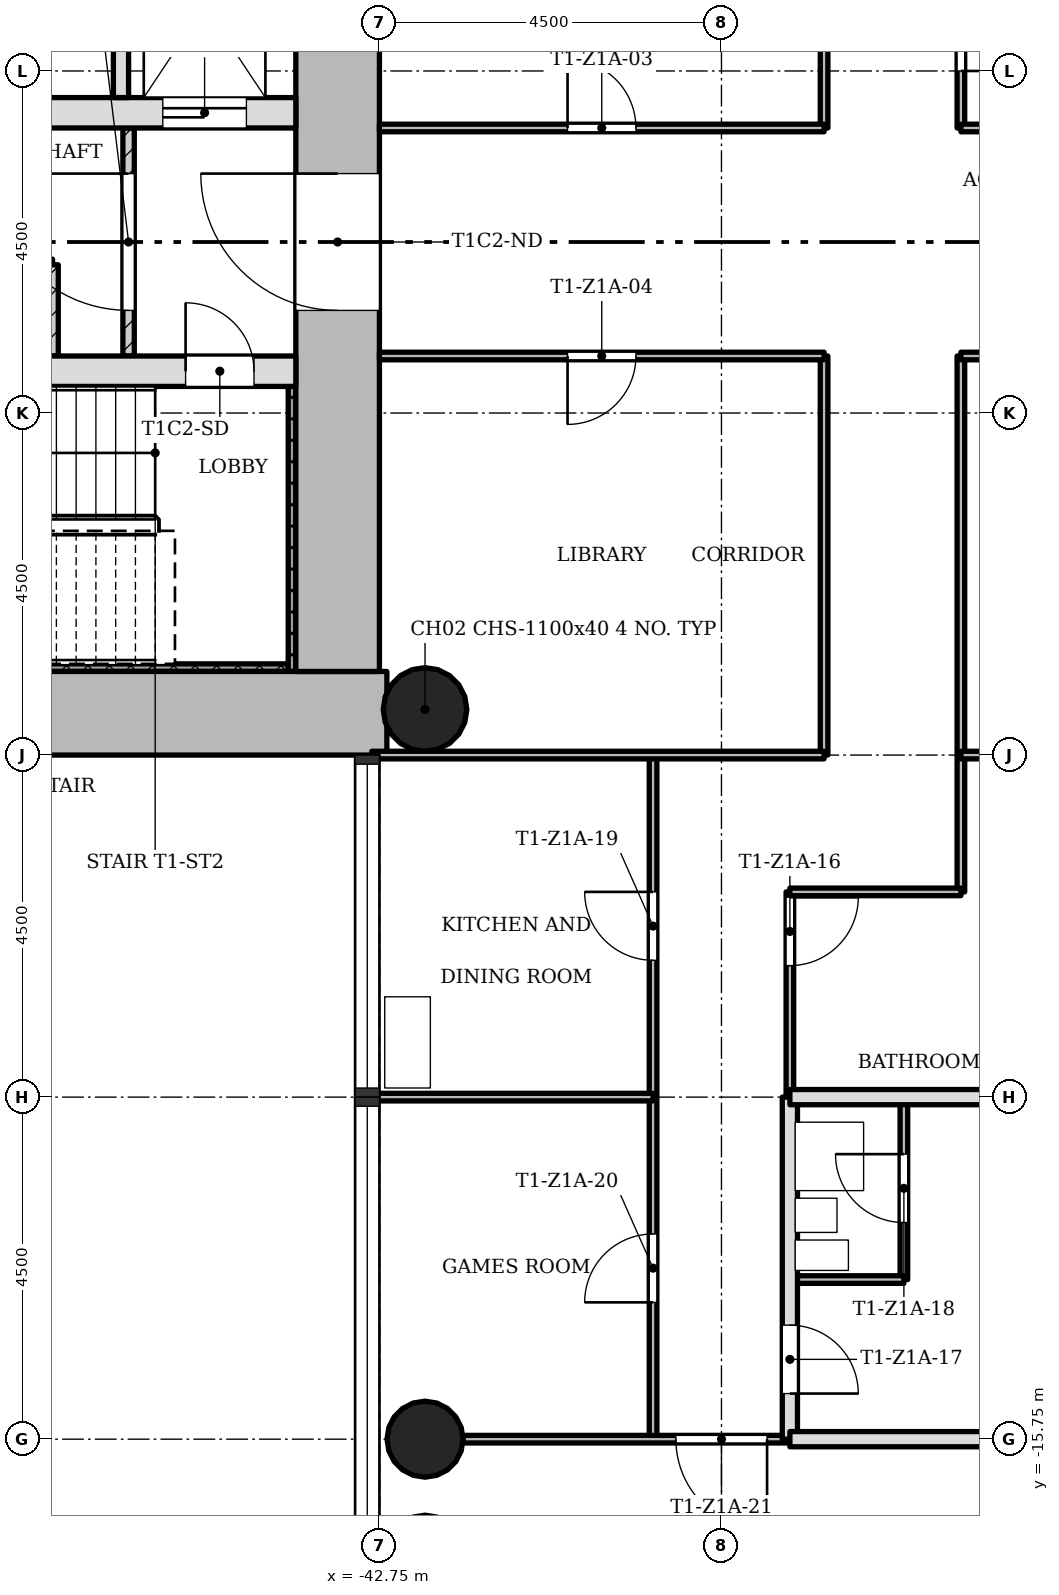
"""IFC4 building model, lengths in metres.
Left out: names, types, materials, properties, quantities, classifications, styles, units other than length and angle.
Written with IfcOpenShell. Run it as: python <this file> out.ifc"""

import sys

from ifc_helpers import new_model, si_unit, direction, frame, frame_2d, origin, origin_2d, place, context, subcontext, project, spatial, rectangle, hollow_circle, extrude, element, fill, save


model = new_model("IFC4")
c1 = context("Model", 3, precision=1e-05, world=origin(), true_north=direction((0.0, 1.0)))
c2 = subcontext(c1, "Body", "Model", "MODEL_VIEW")
j1 = project(units=[si_unit("LENGTHUNIT", "METRE"), si_unit("PLANEANGLEUNIT", "RADIAN")], contexts=[c1])
p1 = place(None, origin())
s1 = spatial("IfcSite", under=j1, at=p1, CompositionType="ELEMENT")
p2 = place(p1, origin())
s2 = spatial("IfcBuilding", under=s1, at=p2, CompositionType="ELEMENT")
p3 = place(p2, frame((0.0, 0.0, 27.9)))
s3 = spatial("IfcBuildingStorey", under=s2, at=p3, CompositionType="ELEMENT", Elevation=27.9)
p4 = place(p3, frame((-50.65, -6.2, 0.0), z_axis=(0.0, 0.0, 1.0), x_axis=(1.0, 0.0, 0.0)))
e1 = element("IfcWall", 1, at=p4, inside=s3, PredefinedType="SHEAR", context=c2, shape_type="SweptSolid", body=[
    extrude(rectangle(XDim=7.998, YDim=1.1, at=frame_2d((3.999, 0.0))), origin(), (0.0, 0.0, 1.0), 3.4),
])
p5 = place(p3, frame((-43.3, -5.65, 0.0), z_axis=(0.0, 0.0, 1.0), x_axis=(0.0, 1.0, 0.0)))
e2 = element("IfcWall", 2, at=p5, inside=s3, PredefinedType="SHEAR", context=c2, shape_type="SweptSolid", body=[
    extrude(rectangle(XDim=12.4, YDim=1.1, at=frame_2d((6.2, 0.0))), origin(), (0.0, 0.0, 1.0), 3.4),
])
p6 = place(p5, frame((4.75, 0.0, 0.0)))
e3 = element("IfcOpeningElement", 3, at=p6, cuts=e2, PredefinedType="OPENING", context=c2, shape_type="SweptSolid", body=[
    extrude(rectangle(XDim=1.8, YDim=2.1, at=frame_2d((0.9, 1.05))), frame((0.0, 0.56, 0.0), z_axis=(0.0, -1.0, 0.0), x_axis=(1.0, 0.0, 0.0)), (0.0, 0.0, 1.0), 1.12),
])
p7 = place(p3, frame((-50.65, -1.7, 0.0), z_axis=(0.0, 0.0, 1.0), x_axis=(1.0, 0.0, 0.0)))
e4 = element("IfcWall", 4, at=p7, inside=s3, PredefinedType="SHEAR", context=c2, shape_type="SweptSolid", body=[
    extrude(rectangle(XDim=6.8, YDim=0.4, at=frame_2d((3.4, 0.0))), origin(), (0.0, 0.0, 1.0), 3.4),
])
p8 = place(p7, frame((5.35, 0.0, 0.0)))
e5 = element("IfcOpeningElement", 5, at=p8, cuts=e4, PredefinedType="OPENING", context=c2, shape_type="SweptSolid", body=[
    extrude(rectangle(XDim=0.9, YDim=2.1, at=frame_2d((0.45, 1.05))), frame((0.0, 0.21, 0.0), z_axis=(0.0, -1.0, 0.0), x_axis=(1.0, 0.0, 0.0)), (0.0, 0.0, 1.0), 0.42),
])
p9 = place(p3, frame((-50.65, 1.7, 0.0), z_axis=(0.0, 0.0, 1.0), x_axis=(1.0, 0.0, 0.0)))
e6 = element("IfcWall", 6, at=p9, inside=s3, PredefinedType="SHEAR", context=c2, shape_type="SweptSolid", body=[
    extrude(rectangle(XDim=6.8, YDim=0.4, at=frame_2d((3.4, 0.0))), origin(), (0.0, 0.0, 1.0), 3.4),
])
p10 = place(p9, frame((5.05, 0.0, 0.0)))
e7 = element("IfcOpeningElement", 7, at=p10, cuts=e6, PredefinedType="OPENING", context=c2, shape_type="SweptSolid", body=[
    extrude(rectangle(XDim=1.1, YDim=2.1, at=frame_2d((0.55, 1.05))), frame((0.0, 0.21, 0.0), z_axis=(0.0, -1.0, 0.0), x_axis=(1.0, 0.0, 0.0)), (0.0, 0.0, 1.0), 0.42),
])
p11 = place(p3, frame((-42.15, -15.75, 0.0), z_axis=(0.0, 0.0, 1.0), x_axis=(1.0, 0.0, 0.0)))
e8 = element("IfcColumn", 8, at=p11, inside=s3, PredefinedType="COLUMN", context=c2, shape_type="SweptSolid", body=[
    extrude(hollow_circle(Radius=0.5, WallThickness=0.036, at=origin_2d()), origin(), (0.0, 0.0, 1.0), 3.4),
])
p12 = place(p3, frame((-42.15, -6.15, 0.0), z_axis=(0.0, 0.0, 1.0), x_axis=(1.0, 0.0, 0.0)))
e9 = element("IfcColumn", 9, at=p12, inside=s3, PredefinedType="COLUMN", context=c2, shape_type="SweptSolid", body=[
    extrude(hollow_circle(Radius=0.55, WallThickness=0.04, at=origin_2d()), origin(), (0.0, 0.0, 1.0), 3.4),
])
p13 = place(p3, frame((-46.05, 1.5, 0.0), z_axis=(0.0, 0.0, 1.0), x_axis=(0.0, -1.0, 0.0)))
e10 = element("IfcWall", 10, at=p13, inside=s3, PredefinedType="PARTITIONING", context=c2, shape_type="SweptSolid", body=[
    extrude(rectangle(XDim=3.0, YDim=0.15, at=frame_2d((1.5, 0.0))), origin(), (0.0, 0.0, 1.0), 3.0),
])
p14 = place(p13, frame((0.6, 0.0, 0.0)))
e11 = element("IfcOpeningElement", 11, at=p14, cuts=e10, PredefinedType="OPENING", context=c2, shape_type="SweptSolid", body=[
    extrude(rectangle(XDim=1.8, YDim=2.1, at=frame_2d((0.9, 1.05))), frame((0.0, 0.085, 0.0), z_axis=(0.0, -1.0, 0.0), x_axis=(1.0, 0.0, 0.0)), (0.0, 0.0, 1.0), 0.17),
])
p15 = place(p3, frame((-46.15, 5.65, 0.0), z_axis=(0.0, 0.0, 1.0), x_axis=(0.0, -1.0, 0.0)))
e12 = element("IfcWall", 12, at=p15, inside=s3, PredefinedType="SOLIDWALL", context=c2, shape_type="SweptSolid", body=[
    extrude(rectangle(XDim=3.75, YDim=0.2, at=frame_2d((1.875, 0.0))), origin(), (0.0, 0.0, 1.0), 3.0),
])
p16 = place(p3, frame((-47.05, -0.3, 0.0), z_axis=(0.0, 0.0, 1.0), x_axis=(0.0, -1.0, 0.0)))
e13 = element("IfcWall", 13, at=p16, inside=s3, PredefinedType="PARTITIONING", context=c2, shape_type="SweptSolid", body=[
    extrude(rectangle(XDim=1.2, YDim=0.15, at=frame_2d((0.6, 0.0))), origin(), (0.0, 0.0, 1.0), 3.0),
])
p17 = place(p3, frame((-39.15, -15.75, 0.0), z_axis=(0.0, 0.0, 1.0), x_axis=(0.0, 1.0, 0.0)))
e14 = element("IfcWall", 14, at=p17, inside=s3, PredefinedType="PARTITIONING", context=c2, shape_type="SweptSolid", body=[
    extrude(rectangle(XDim=9.0, YDim=0.1, at=frame_2d((4.5, 0.0))), origin(), (0.0, 0.0, 1.0), 3.0),
])
p18 = place(p17, frame((6.3, 0.0, 0.0)))
e15 = element("IfcOpeningElement", 15, at=p18, cuts=e14, PredefinedType="OPENING", context=c2, shape_type="SweptSolid", body=[
    extrude(rectangle(XDim=0.9, YDim=2.1, at=frame_2d((0.45, 1.05))), frame((0.0, 0.06, 0.0), z_axis=(0.0, -1.0, 0.0), x_axis=(1.0, 0.0, 0.0)), (0.0, 0.0, 1.0), 0.12),
])
p19 = place(p17, frame((1.8, 0.0, 0.0)))
e16 = element("IfcOpeningElement", 16, at=p19, cuts=e14, PredefinedType="OPENING", context=c2, shape_type="SweptSolid", body=[
    extrude(rectangle(XDim=0.9, YDim=2.1, at=frame_2d((0.45, 1.05))), frame((0.0, 0.06, 0.0), z_axis=(0.0, -1.0, 0.0), x_axis=(1.0, 0.0, 0.0)), (0.0, 0.0, 1.0), 0.12),
])
p20 = place(p3, frame((-37.35, -11.25, 0.0), z_axis=(0.0, 0.0, 1.0), x_axis=(0.0, 1.0, 0.0)))
e17 = element("IfcWall", 17, at=p20, inside=s3, PredefinedType="PARTITIONING", context=c2, shape_type="SweptSolid", body=[
    extrude(rectangle(XDim=2.7, YDim=0.1, at=frame_2d((1.35, 0.0))), origin(), (0.0, 0.0, 1.0), 3.0),
])
p21 = place(p20, frame((1.73, 0.0, 0.0)))
e18 = element("IfcOpeningElement", 18, at=p21, cuts=e17, PredefinedType="OPENING", context=c2, shape_type="SweptSolid", body=[
    extrude(rectangle(XDim=0.9, YDim=2.1, at=frame_2d((0.45, 1.05))), frame((0.0, 0.06, 0.0), z_axis=(0.0, -1.0, 0.0), x_axis=(1.0, 0.0, 0.0)), (0.0, 0.0, 1.0), 0.12),
])
p22 = place(p3, frame((-37.35, -15.75, 0.0), z_axis=(0.0, 0.0, 1.0), x_axis=(0.0, 1.0, 0.0)))
e19 = element("IfcWall", 19, at=p22, inside=s3, PredefinedType="SOLIDWALL", context=c2, shape_type="SweptSolid", body=[
    extrude(rectangle(XDim=4.5, YDim=0.2, at=frame_2d((2.25, 0.0))), origin(), (0.0, 0.0, 1.0), 3.0),
])
p23 = place(p22, frame((0.6, 0.0, 0.0)))
e20 = element("IfcOpeningElement", 20, at=p23, cuts=e19, PredefinedType="OPENING", context=c2, shape_type="SweptSolid", body=[
    extrude(rectangle(XDim=0.9, YDim=2.1, at=frame_2d((0.45, 1.05))), frame((0.0, 0.11, 0.0), z_axis=(0.0, -1.0, 0.0), x_axis=(1.0, 0.0, 0.0)), (0.0, 0.0, 1.0), 0.22),
])
for number, where, z_axis, x_axis in (
    (21, (-36.9, -6.75, 0.0), (0.0, 0.0, 1.0), (0.0, 1.0, 0.0)),
    (22, (-36.9, 1.5, 0.0), (0.0, 0.0, 1.0), (0.0, 1.0, 0.0)),
):
    element("IfcWall", number, at=place(p3, frame(where, z_axis=z_axis, x_axis=x_axis)), inside=s3, PredefinedType="PARTITIONING", context=c2, shape_type="SweptSolid", body=[
        extrude(rectangle(XDim=5.25, YDim=0.1, at=frame_2d((2.625, 0.0))), origin(), (0.0, 0.0, 1.0), 3.0),
    ])
p24 = place(p3, frame((-35.85, -13.65, 0.0), z_axis=(0.0, 0.0, 1.0), x_axis=(0.0, 1.0, 0.0)))
e23 = element("IfcWall", 23, at=p24, inside=s3, PredefinedType="PARTITIONING", context=c2, shape_type="SweptSolid", body=[
    extrude(rectangle(XDim=2.4, YDim=0.1, at=frame_2d((1.2, 0.0))), origin(), (0.0, 0.0, 1.0), 3.0),
])
p25 = place(p24, frame((0.75, 0.0, 0.0)))
e24 = element("IfcOpeningElement", 24, at=p25, cuts=e23, PredefinedType="OPENING", context=c2, shape_type="SweptSolid", body=[
    extrude(rectangle(XDim=0.9, YDim=2.1, at=frame_2d((0.45, 1.05))), frame((0.0, 0.06, 0.0), z_axis=(0.0, -1.0, 0.0), x_axis=(1.0, 0.0, 0.0)), (0.0, 0.0, 1.0), 0.12),
])
p26 = place(p3, frame((-35.1, -8.55, 0.0), z_axis=(0.0, 0.0, 1.0), x_axis=(0.0, 1.0, 0.0)))
e25 = element("IfcWall", 25, at=p26, inside=s3, PredefinedType="PARTITIONING", context=c2, shape_type="SweptSolid", body=[
    extrude(rectangle(XDim=7.05, YDim=0.1, at=frame_2d((3.525, 0.0))), origin(), (0.0, 0.0, 1.0), 3.0),
])
p27 = place(p3, frame((-35.1, 1.5, 0.0), z_axis=(0.0, 0.0, 1.0), x_axis=(0.0, 1.0, 0.0)))
e26 = element("IfcWall", 26, at=p27, inside=s3, PredefinedType="PARTITIONING", context=c2, shape_type="SweptSolid", body=[
    extrude(rectangle(XDim=5.25, YDim=0.1, at=frame_2d((2.625, 0.0))), origin(), (0.0, 0.0, 1.0), 3.0),
])
p28 = place(p27, frame((0.75, 0.0, 0.0)))
e27 = element("IfcOpeningElement", 27, at=p28, cuts=e26, PredefinedType="OPENING", context=c2, shape_type="SweptSolid", body=[
    extrude(rectangle(XDim=0.9, YDim=2.1, at=frame_2d((0.45, 1.05))), frame((0.0, 0.06, 0.0), z_axis=(0.0, -1.0, 0.0), x_axis=(1.0, 0.0, 0.0)), (0.0, 0.0, 1.0), 0.12),
])
p29 = place(p3, frame((-41.65, -15.75, 0.0), z_axis=(0.0, 0.0, 1.0), x_axis=(1.0, 0.0, 0.0)))
e28 = element("IfcWall", 28, at=p29, inside=s3, PredefinedType="PARTITIONING", context=c2, shape_type="SweptSolid", body=[
    extrude(rectangle(XDim=4.3, YDim=0.1, at=frame_2d((2.15, 0.0))), origin(), (0.0, 0.0, 1.0), 3.0),
])
p30 = place(p29, frame((2.8, 0.0, 0.0)))
e29 = element("IfcOpeningElement", 29, at=p30, cuts=e28, PredefinedType="OPENING", context=c2, shape_type="SweptSolid", body=[
    extrude(rectangle(XDim=1.2, YDim=2.1, at=frame_2d((0.6, 1.05))), frame((0.0, 0.06, 0.0), z_axis=(0.0, -1.0, 0.0), x_axis=(1.0, 0.0, 0.0)), (0.0, 0.0, 1.0), 0.12),
])
p31 = place(p3, frame((-37.35, -15.75, 0.0), z_axis=(0.0, 0.0, 1.0), x_axis=(1.0, 0.0, 0.0)))
e30 = element("IfcWall", 30, at=p31, inside=s3, PredefinedType="SOLIDWALL", context=c2, shape_type="SweptSolid", body=[
    extrude(rectangle(XDim=7.0, YDim=0.2, at=frame_2d((3.5, 0.0))), origin(), (0.0, 0.0, 1.0), 3.0),
])
p32 = place(p3, frame((-37.35, -13.65, 0.0), z_axis=(0.0, 0.0, 1.0), x_axis=(1.0, 0.0, 0.0)))
e31 = element("IfcWall", 31, at=p32, inside=s3, PredefinedType="PARTITIONING", context=c2, shape_type="SweptSolid", body=[
    extrude(rectangle(XDim=1.5, YDim=0.1, at=frame_2d((0.75, 0.0))), origin(), (0.0, 0.0, 1.0), 3.0),
])
p33 = place(p3, frame((-42.85, -11.25, 0.0), z_axis=(0.0, 0.0, 1.0), x_axis=(1.0, 0.0, 0.0)))
e32 = element("IfcWall", 32, at=p33, inside=s3, PredefinedType="PARTITIONING", context=c2, shape_type="SweptSolid", body=[
    extrude(rectangle(XDim=3.7, YDim=0.1, at=frame_2d((1.85, 0.0))), origin(), (0.0, 0.0, 1.0), 3.0),
])
p34 = place(p3, frame((-37.35, -11.25, 0.0), z_axis=(0.0, 0.0, 1.0), x_axis=(1.0, 0.0, 0.0)))
e33 = element("IfcWall", 33, at=p34, inside=s3, PredefinedType="SOLIDWALL", context=c2, shape_type="SweptSolid", body=[
    extrude(rectangle(XDim=8.2, YDim=0.2, at=frame_2d((4.1, 0.0))), origin(), (0.0, 0.0, 1.0), 3.0),
])
p35 = place(p3, frame((-37.35, -8.55, 0.0), z_axis=(0.0, 0.0, 1.0), x_axis=(1.0, 0.0, 0.0)))
e34 = element("IfcWall", 34, at=p35, inside=s3, PredefinedType="PARTITIONING", context=c2, shape_type="SweptSolid", body=[
    extrude(rectangle(XDim=2.25, YDim=0.1, at=frame_2d((1.125, 0.0))), origin(), (0.0, 0.0, 1.0), 3.0),
])
for number, where, z_axis, x_axis in (
    (35, (-42.85, -6.75, 0.0), (0.0, 0.0, 1.0), (1.0, 0.0, 0.0)),
    (36, (-35.1, -6.75, 0.0), (0.0, 0.0, 1.0), (1.0, 0.0, 0.0)),
):
    element("IfcWall", number, at=place(p3, frame(where, z_axis=z_axis, x_axis=x_axis)), inside=s3, PredefinedType="PARTITIONING", context=c2, shape_type="SweptSolid", body=[
        extrude(rectangle(XDim=5.95, YDim=0.1, at=frame_2d((2.975, 0.0))), origin(), (0.0, 0.0, 1.0), 3.0),
    ])
p36 = place(p3, frame((-42.75, -1.5, 0.0), z_axis=(0.0, 0.0, 1.0), x_axis=(1.0, 0.0, 0.0)))
e37 = element("IfcWall", 37, at=p36, inside=s3, PredefinedType="PARTITIONING", context=c2, shape_type="SweptSolid", body=[
    extrude(rectangle(XDim=5.85, YDim=0.1, at=frame_2d((2.925, 0.0))), origin(), (0.0, 0.0, 1.0), 3.0),
])
p37 = place(p36, frame((2.475, 0.0, 0.0)))
e38 = element("IfcOpeningElement", 38, at=p37, cuts=e37, PredefinedType="OPENING", context=c2, shape_type="SweptSolid", body=[
    extrude(rectangle(XDim=0.9, YDim=2.1, at=frame_2d((0.45, 1.05))), frame((0.0, 0.06, 0.0), z_axis=(0.0, -1.0, 0.0), x_axis=(1.0, 0.0, 0.0)), (0.0, 0.0, 1.0), 0.12),
])
p38 = place(p3, frame((-35.1, -1.5, 0.0), z_axis=(0.0, 0.0, 1.0), x_axis=(1.0, 0.0, 0.0)))
e39 = element("IfcWall", 39, at=p38, inside=s3, PredefinedType="PARTITIONING", context=c2, shape_type="SweptSolid", body=[
    extrude(rectangle(XDim=5.85, YDim=0.1, at=frame_2d((2.925, 0.0))), origin(), (0.0, 0.0, 1.0), 3.0),
])
p39 = place(p38, frame((2.475, 0.0, 0.0)))
e40 = element("IfcOpeningElement", 40, at=p39, cuts=e39, PredefinedType="OPENING", context=c2, shape_type="SweptSolid", body=[
    extrude(rectangle(XDim=0.9, YDim=2.1, at=frame_2d((0.45, 1.05))), frame((0.0, 0.06, 0.0), z_axis=(0.0, -1.0, 0.0), x_axis=(1.0, 0.0, 0.0)), (0.0, 0.0, 1.0), 0.12),
])
p40 = place(p3, frame((-42.75, 1.5, 0.0), z_axis=(0.0, 0.0, 1.0), x_axis=(1.0, 0.0, 0.0)))
e41 = element("IfcWall", 41, at=p40, inside=s3, PredefinedType="PARTITIONING", context=c2, shape_type="SweptSolid", body=[
    extrude(rectangle(XDim=5.85, YDim=0.1, at=frame_2d((2.925, 0.0))), origin(), (0.0, 0.0, 1.0), 3.0),
])
p41 = place(p40, frame((2.475, 0.0, 0.0)))
e42 = element("IfcOpeningElement", 42, at=p41, cuts=e41, PredefinedType="OPENING", context=c2, shape_type="SweptSolid", body=[
    extrude(rectangle(XDim=0.9, YDim=2.1, at=frame_2d((0.45, 1.05))), frame((0.0, 0.06, 0.0), z_axis=(0.0, -1.0, 0.0), x_axis=(1.0, 0.0, 0.0)), (0.0, 0.0, 1.0), 0.12),
])
p42 = place(p3, frame((-35.1, 1.5, 0.0), z_axis=(0.0, 0.0, 1.0), x_axis=(1.0, 0.0, 0.0)))
e43 = element("IfcWall", 43, at=p42, inside=s3, PredefinedType="PARTITIONING", context=c2, shape_type="SweptSolid", body=[
    extrude(rectangle(XDim=5.85, YDim=0.1, at=frame_2d((2.925, 0.0))), origin(), (0.0, 0.0, 1.0), 3.0),
])
p43 = place(p42, frame((3.375, 0.0, 0.0)))
e44 = element("IfcOpeningElement", 44, at=p43, cuts=e43, PredefinedType="OPENING", context=c2, shape_type="SweptSolid", body=[
    extrude(rectangle(XDim=0.9, YDim=2.1, at=frame_2d((0.45, 1.05))), frame((0.0, 0.06, 0.0), z_axis=(0.0, -1.0, 0.0), x_axis=(1.0, 0.0, 0.0)), (0.0, 0.0, 1.0), 0.12),
])
p44 = place(p3, frame((-43.95, -5.6, 0.0), z_axis=(0.0, 0.0, 1.0), x_axis=(-1.0, 0.0, 0.0)))
e45 = element("IfcWall", 45, at=p44, inside=s3, PredefinedType="SHEAR", context=c2, shape_type="SweptSolid", body=[
    extrude(rectangle(XDim=6.6, YDim=0.1, at=frame_2d((3.3, 0.0))), origin(), (0.0, 0.0, 1.0), 3.4),
])
p45 = place(p3, frame((-43.9, -1.9, 0.0), z_axis=(0.0, 0.0, 1.0), x_axis=(0.0, -1.0, 0.0)))
e46 = element("IfcWall", 46, at=p45, inside=s3, PredefinedType="SHEAR", context=c2, shape_type="SweptSolid", body=[
    extrude(rectangle(XDim=3.75, YDim=0.1, at=frame_2d((1.875, 0.0))), origin(), (0.0, 0.0, 1.0), 3.4),
])
p46 = place(p14, origin())
e47 = element("IfcDoor", 47, at=p46, inside=s3, OperationType="SINGLE_SWING_LEFT", PredefinedType="DOOR", context=c2, shape_type="SweptSolid", body=[
    extrude(rectangle(XDim=1.8, YDim=2.1, at=frame_2d((0.9, 1.05))), frame((0.0, 0.025, 0.0), z_axis=(0.0, -1.0, 0.0), x_axis=(1.0, 0.0, 0.0)), (0.0, 0.0, 1.0), 0.05),
])
fill(e11, e47)
p47 = place(p28, origin())
e48 = element("IfcDoor", 48, at=p47, inside=s3, OperationType="SINGLE_SWING_LEFT", PredefinedType="DOOR", context=c2, shape_type="SweptSolid", body=[
    extrude(rectangle(XDim=0.9, YDim=2.1, at=frame_2d((0.45, 1.05))), frame((0.0, 0.025, 0.0), z_axis=(0.0, -1.0, 0.0), x_axis=(1.0, 0.0, 0.0)), (0.0, 0.0, 1.0), 0.05),
])
fill(e27, e48)
p48 = place(p41, origin())
e49 = element("IfcDoor", 49, at=p48, inside=s3, OperationType="SINGLE_SWING_RIGHT", PredefinedType="DOOR", context=c2, shape_type="SweptSolid", body=[
    extrude(rectangle(XDim=0.9, YDim=2.1, at=frame_2d((0.45, 1.05))), frame((0.0, 0.025, 0.0), z_axis=(0.0, -1.0, 0.0), x_axis=(1.0, 0.0, 0.0)), (0.0, 0.0, 1.0), 0.05),
])
fill(e42, e49)
p49 = place(p37, origin())
e50 = element("IfcDoor", 50, at=p49, inside=s3, OperationType="SINGLE_SWING_LEFT", PredefinedType="DOOR", context=c2, shape_type="SweptSolid", body=[
    extrude(rectangle(XDim=0.9, YDim=2.1, at=frame_2d((0.45, 1.05))), frame((0.0, 0.025, 0.0), z_axis=(0.0, -1.0, 0.0), x_axis=(1.0, 0.0, 0.0)), (0.0, 0.0, 1.0), 0.05),
])
fill(e38, e50)
p50 = place(p21, origin())
e51 = element("IfcDoor", 51, at=p50, inside=s3, OperationType="SINGLE_SWING_RIGHT", PredefinedType="DOOR", context=c2, shape_type="SweptSolid", body=[
    extrude(rectangle(XDim=0.9, YDim=2.1, at=frame_2d((0.45, 1.05))), frame((0.0, 0.025, 0.0), z_axis=(0.0, -1.0, 0.0), x_axis=(1.0, 0.0, 0.0)), (0.0, 0.0, 1.0), 0.05),
])
fill(e18, e51)
p51 = place(p23, origin())
e52 = element("IfcDoor", 52, at=p51, inside=s3, OperationType="SINGLE_SWING_LEFT", PredefinedType="DOOR", context=c2, shape_type="SweptSolid", body=[
    extrude(rectangle(XDim=0.9, YDim=2.1, at=frame_2d((0.45, 1.05))), frame((0.0, 0.025, 0.0), z_axis=(0.0, -1.0, 0.0), x_axis=(1.0, 0.0, 0.0)), (0.0, 0.0, 1.0), 0.05),
])
fill(e20, e52)
p52 = place(p25, origin())
e53 = element("IfcDoor", 53, at=p52, inside=s3, OperationType="SINGLE_SWING_LEFT", PredefinedType="DOOR", context=c2, shape_type="SweptSolid", body=[
    extrude(rectangle(XDim=0.9, YDim=2.1, at=frame_2d((0.45, 1.05))), frame((0.0, 0.025, 0.0), z_axis=(0.0, -1.0, 0.0), x_axis=(1.0, 0.0, 0.0)), (0.0, 0.0, 1.0), 0.05),
])
fill(e24, e53)
p53 = place(p18, origin())
e54 = element("IfcDoor", 54, at=p53, inside=s3, OperationType="SINGLE_SWING_LEFT", PredefinedType="DOOR", context=c2, shape_type="SweptSolid", body=[
    extrude(rectangle(XDim=0.9, YDim=2.1, at=frame_2d((0.45, 1.05))), frame((0.0, 0.025, 0.0), z_axis=(0.0, -1.0, 0.0), x_axis=(1.0, 0.0, 0.0)), (0.0, 0.0, 1.0), 0.05),
])
fill(e15, e54)
p54 = place(p19, origin())
e55 = element("IfcDoor", 55, at=p54, inside=s3, OperationType="SINGLE_SWING_RIGHT", PredefinedType="DOOR", context=c2, shape_type="SweptSolid", body=[
    extrude(rectangle(XDim=0.9, YDim=2.1, at=frame_2d((0.45, 1.05))), frame((0.0, 0.025, 0.0), z_axis=(0.0, -1.0, 0.0), x_axis=(1.0, 0.0, 0.0)), (0.0, 0.0, 1.0), 0.05),
])
fill(e16, e55)
p55 = place(p30, origin())
e56 = element("IfcDoor", 56, at=p55, inside=s3, OperationType="SINGLE_SWING_RIGHT", PredefinedType="DOOR", context=c2, shape_type="SweptSolid", body=[
    extrude(rectangle(XDim=1.2, YDim=2.1, at=frame_2d((0.6, 1.05))), frame((0.0, 0.025, 0.0), z_axis=(0.0, -1.0, 0.0), x_axis=(1.0, 0.0, 0.0)), (0.0, 0.0, 1.0), 0.05),
])
fill(e29, e56)
p56 = place(p8, origin())
e57 = element("IfcDoor", 57, at=p56, inside=s3, OperationType="SINGLE_SWING_RIGHT", PredefinedType="DOOR", context=c2, shape_type="SweptSolid", body=[
    extrude(rectangle(XDim=0.9, YDim=2.1, at=frame_2d((0.45, 1.05))), frame((0.0, 0.025, 0.0), z_axis=(0.0, -1.0, 0.0), x_axis=(1.0, 0.0, 0.0)), (0.0, 0.0, 1.0), 0.05),
])
fill(e5, e57)
p57 = place(p10, origin())
e58 = element("IfcDoor", 58, at=p57, inside=s3, OperationType="SLIDING_TO_LEFT", PredefinedType="DOOR", context=c2, shape_type="SweptSolid", body=[
    extrude(rectangle(XDim=1.1, YDim=2.1, at=frame_2d((0.55, 1.05))), frame((0.0, 0.025, 0.0), z_axis=(0.0, -1.0, 0.0), x_axis=(1.0, 0.0, 0.0)), (0.0, 0.0, 1.0), 0.05),
])
fill(e7, e58)
p58 = place(p6, origin())
e59 = element("IfcDoor", 59, at=p58, inside=s3, OperationType="SINGLE_SWING_LEFT", PredefinedType="DOOR", context=c2, shape_type="SweptSolid", body=[
    extrude(rectangle(XDim=1.8, YDim=2.1, at=frame_2d((0.9, 1.05))), frame((0.0, 0.025, 0.0), z_axis=(0.0, -1.0, 0.0), x_axis=(1.0, 0.0, 0.0)), (0.0, 0.0, 1.0), 0.05),
])
fill(e3, e59)
save(model, sys.argv[1])
